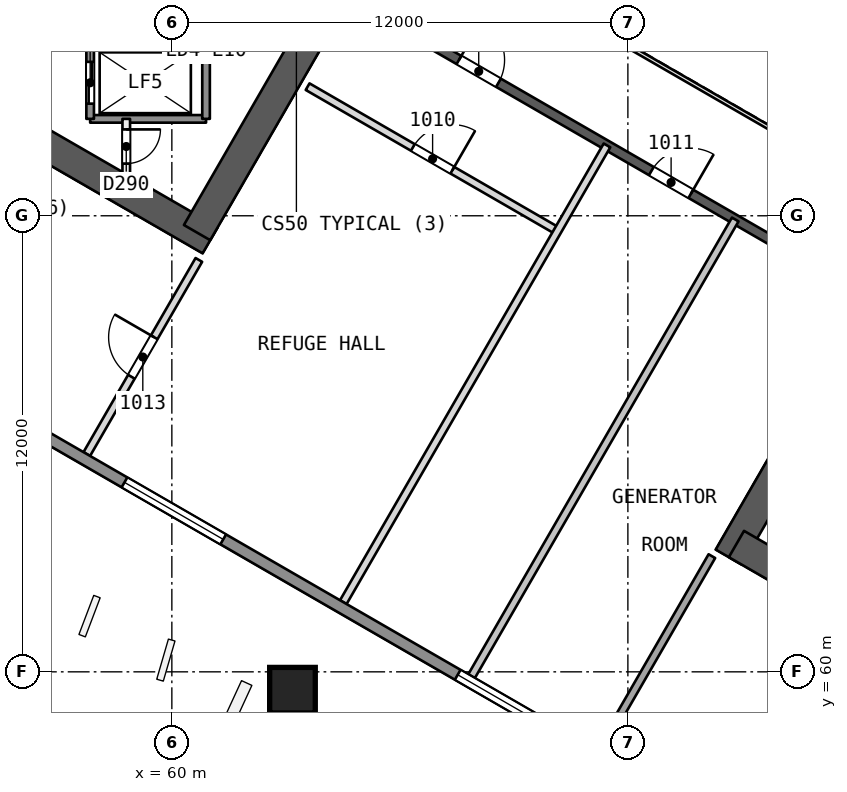
"""IFC4 building model, lengths in metres.
Left out: names, types, materials, properties, quantities, classifications, styles, units other than length and angle.
Written with IfcOpenShell. Run it as: python <this file> out.ifc"""

import sys

from ifc_helpers import new_model, si_unit, direction, frame, frame_2d, origin, origin_2d, place, context, subcontext, project, spatial, rectangle, extrude, element, fill, save


model = new_model("IFC4")
c1 = context("Model", 3, precision=1e-05, world=origin(), true_north=direction((0.0, 1.0)))
c2 = subcontext(c1, "Body", "Model", "MODEL_VIEW")
j1 = project(units=[si_unit("LENGTHUNIT", "METRE"), si_unit("PLANEANGLEUNIT", "RADIAN")], contexts=[c1])
p1 = place(None, origin())
s1 = spatial("IfcSite", under=j1, at=p1, CompositionType="ELEMENT")
p2 = place(p1, origin())
s2 = spatial("IfcBuilding", under=s1, at=p2, CompositionType="ELEMENT")
p3 = place(p2, frame((0.0, 0.0, 48.5)))
s3 = spatial("IfcBuildingStorey", under=s2, at=p3, CompositionType="ELEMENT", Elevation=48.5)
p4 = place(p3, frame((48.797, 78.408, 0.0), z_axis=(0.0, 0.0, 1.0), x_axis=(0.866032504327, -0.499987701298, 0.0)))
e1 = element("IfcWall", 1, at=p4, inside=s3, PredefinedType="SHEAR", context=c2, shape_type="SweptSolid", body=[
    extrude(rectangle(XDim=14.102, YDim=0.8, at=frame_2d((7.051, 0.0))), origin(), (0.0, 0.0, 1.0), 4.4),
])
p5 = place(p3, frame((60.664, 71.557, 0.0), z_axis=(0.0, 0.0, 1.0), x_axis=(0.50000409368, 0.866023040284, 0.0)))
e2 = element("IfcWall", 2, at=p5, inside=s3, PredefinedType="SHEAR", context=c2, shape_type="SweptSolid", body=[
    extrude(rectangle(XDim=9.98, YDim=0.8, at=frame_2d((4.99, 0.0))), origin(), (0.0, 0.0, 1.0), 4.4),
])
p6 = place(p5, frame((7.83, 0.0, 0.0)))
e3 = element("IfcOpeningElement", 3, at=p6, cuts=e2, PredefinedType="OPENING", context=c2, shape_type="SweptSolid", body=[
    extrude(rectangle(XDim=1.2, YDim=2.1, at=frame_2d((0.6, 1.05))), frame((0.0, 0.411, 0.0), z_axis=(0.0, -1.0, 0.0), x_axis=(1.0, 0.0, 0.0)), (0.0, 0.0, 1.0), 0.821),
])
p7 = place(p3, frame((79.731, 71.806, 0.0), z_axis=(0.0, 0.0, 1.0), x_axis=(-0.49999662545, -0.866027352073, 0.0)))
e4 = element("IfcWall", 4, at=p7, inside=s3, PredefinedType="SHEAR", context=c2, shape_type="SweptSolid", body=[
    extrude(rectangle(XDim=10.149, YDim=0.8, at=frame_2d((5.074, 0.0))), origin(), (0.0, 0.0, 1.0), 4.4),
])
p8 = place(p7, frame((0.719, 0.0, 0.0)))
e5 = element("IfcOpeningElement", 5, at=p8, cuts=e4, PredefinedType="OPENING", context=c2, shape_type="SweptSolid", body=[
    extrude(rectangle(XDim=1.2, YDim=2.1, at=frame_2d((0.6, 1.05))), frame((0.0, 0.411, 0.0), z_axis=(0.0, -1.0, 0.0), x_axis=(1.0, 0.0, 0.0)), (0.0, 0.0, 1.0), 0.821),
])
p9 = place(p3, frame((74.856, 63.363, 0.0), z_axis=(0.0, 0.0, 1.0), x_axis=(0.866029478545, -0.499992942241, 0.0)))
e6 = element("IfcWall", 6, at=p9, inside=s3, PredefinedType="SHEAR", context=c2, shape_type="SweptSolid", body=[
    extrude(rectangle(XDim=13.933, YDim=0.8, at=frame_2d((6.967, 0.0))), origin(), (0.0, 0.0, 1.0), 4.4),
])
p10 = place(p3, frame((64.7, 77.748, 0.0), z_axis=(0.0, 0.0, 1.0), x_axis=(0.866026492143, -0.499998114903, 0.0)))
e7 = element("IfcWall", 7, at=p10, inside=s3, PredefinedType="SHEAR", context=c2, shape_type="SweptSolid", body=[
    extrude(rectangle(XDim=15.588, YDim=0.25, at=frame_2d((7.794, 0.0))), origin(), (0.0, 0.0, 1.0), 3.9),
])
p11 = place(p10, frame((3.297, 0.0, 0.0)))
e8 = element("IfcOpeningElement", 8, at=p11, cuts=e7, PredefinedType="OPENING", context=c2, shape_type="SweptSolid", body=[
    extrude(rectangle(XDim=1.2, YDim=2.4, at=frame_2d((0.6, 1.2))), frame((0.0, 0.135, 0.0), z_axis=(0.0, -1.0, 0.0), x_axis=(1.0, 0.0, 0.0)), (0.0, 0.0, 1.0), 0.271),
])
p12 = place(p10, frame((9.143, 0.0, 0.0)))
e9 = element("IfcOpeningElement", 9, at=p12, cuts=e7, PredefinedType="OPENING", context=c2, shape_type="SweptSolid", body=[
    extrude(rectangle(XDim=1.2, YDim=2.4, at=frame_2d((0.6, 1.2))), frame((0.0, 0.135, 0.0), z_axis=(0.0, -1.0, 0.0), x_axis=(1.0, 0.0, 0.0)), (0.0, 0.0, 1.0), 0.271),
])
p13 = place(p10, frame((13.04, 0.0, 0.0)))
e10 = element("IfcOpeningElement", 10, at=p13, cuts=e7, PredefinedType="OPENING", context=c2, shape_type="SweptSolid", body=[
    extrude(rectangle(XDim=1.2, YDim=2.4, at=frame_2d((0.6, 1.2))), frame((0.0, 0.135, 0.0), z_axis=(0.0, -1.0, 0.0), x_axis=(1.0, 0.0, 0.0)), (0.0, 0.0, 1.0), 0.271),
])
p14 = place(p3, frame((63.162, 59.496, 0.0), z_axis=(0.010041240412, 0.017475086904, 0.999796876785), x_axis=(-0.498116032596, -0.866876123157, 0.020154532277)))
e11 = element("IfcColumn", 11, at=p14, inside=s3, PredefinedType="COLUMN", context=c2, shape_type="SweptSolid", body=[
    extrude(rectangle(XDim=1.2, YDim=1.2, at=origin_2d()), origin(), (0.0, 0.0, 1.0), 4.401),
])
p15 = place(p3, frame((63.572, 75.397, 0.0), z_axis=(0.0, 0.0, 1.0), x_axis=(0.866024999478, -0.500000700278, 0.0)))
e12 = element("IfcWall", 12, at=p15, inside=s3, PredefinedType="PARTITIONING", context=c2, shape_type="SweptSolid", body=[
    extrude(rectangle(XDim=7.595, YDim=0.2, at=frame_2d((3.798, 0.0))), origin(), (0.0, 0.0, 1.0), 3.9),
])
p16 = place(p15, frame((3.198, 0.0, 0.0)))
e13 = element("IfcOpeningElement", 13, at=p16, cuts=e12, PredefinedType="OPENING", context=c2, shape_type="SweptSolid", body=[
    extrude(rectangle(XDim=1.2, YDim=2.4, at=frame_2d((0.6, 1.2))), frame((0.0, 0.11, 0.0), z_axis=(0.0, -1.0, 0.0), x_axis=(1.0, 0.0, 0.0)), (0.0, 0.0, 1.0), 0.221),
])
p17 = place(p3, frame((64.511, 61.833, 0.0), z_axis=(0.0, 0.0, 1.0), x_axis=(0.499997074782, 0.866027092653, 0.0)))
e14 = element("IfcWall", 14, at=p17, inside=s3, PredefinedType="PARTITIONING", context=c2, shape_type="SweptSolid", body=[
    extrude(rectangle(XDim=13.877, YDim=0.2, at=frame_2d((6.939, 0.0))), origin(), (0.0, 0.0, 1.0), 3.9),
])
p18 = place(p3, frame((57.761, 65.73, 0.0), z_axis=(0.0, 0.0, 1.0), x_axis=(0.499985191823, 0.866033953121, 0.0)))
e15 = element("IfcWall", 15, at=p18, inside=s3, PredefinedType="PARTITIONING", context=c2, shape_type="SweptSolid", body=[
    extrude(rectangle(XDim=5.899, YDim=0.2, at=frame_2d((2.949, 0.0))), origin(), (0.0, 0.0, 1.0), 3.9),
])
p19 = place(p18, frame((2.349, 0.0, 0.0)))
e16 = element("IfcOpeningElement", 16, at=p19, cuts=e15, PredefinedType="OPENING", context=c2, shape_type="SweptSolid", body=[
    extrude(rectangle(XDim=1.2, YDim=2.4, at=frame_2d((0.6, 1.2))), frame((0.0, 0.11, 0.0), z_axis=(0.0, -1.0, 0.0), x_axis=(1.0, 0.0, 0.0)), (0.0, 0.0, 1.0), 0.221),
])
p20 = place(p3, frame((67.886, 59.884, 0.0), z_axis=(0.0, 0.0, 1.0), x_axis=(0.499997074782, 0.866027092653, 0.0)))
e17 = element("IfcWall", 17, at=p20, inside=s3, PredefinedType="PARTITIONING", context=c2, shape_type="SweptSolid", body=[
    extrude(rectangle(XDim=13.877, YDim=0.2, at=frame_2d((6.939, 0.0))), origin(), (0.0, 0.0, 1.0), 3.9),
])
p21 = place(p3, frame((74.21, 63.044, 0.0), z_axis=(0.0, 0.0, 1.0), x_axis=(-0.499985191823, -0.866033953121, 0.0)))
e18 = element("IfcWall", 18, at=p21, inside=s3, PredefinedType="PARTITIONING", context=c2, shape_type="SweptSolid", body=[
    extrude(rectangle(XDim=5.899, YDim=0.2, at=frame_2d((2.949, 0.0))), origin(), (0.0, 0.0, 1.0), 3.9),
])
p22 = place(p3, frame((90.743, 46.516, 0.0), z_axis=(0.0, 0.0, 1.0), x_axis=(-0.866025105017, 0.50000051748, 0.0)))
e19 = element("IfcWall", 19, at=p22, inside=s3, PredefinedType="SOLIDWALL", context=c2, shape_type="SweptSolid", body=[
    extrude(rectangle(XDim=60.751, YDim=0.3, at=frame_2d((30.375, 0.0))), origin(), (0.0, 0.0, 1.0), 3.9),
])
p23 = place(p22, frame((3.562, 0.0, 0.6)))
e20 = element("IfcOpeningElement", 20, at=p23, cuts=e19, PredefinedType="OPENING", context=c2, shape_type="SweptSolid", body=[
    extrude(rectangle(XDim=3.0, YDim=2.4, at=frame_2d((1.5, 1.2))), frame((0.0, 0.161, 0.0), z_axis=(0.0, -1.0, 0.0), x_axis=(1.0, 0.0, 0.0)), (0.0, 0.0, 1.0), 0.321),
])
p24 = place(p22, frame((13.688, 0.0, 0.6)))
e21 = element("IfcOpeningElement", 21, at=p24, cuts=e19, PredefinedType="OPENING", context=c2, shape_type="SweptSolid", body=[
    extrude(rectangle(XDim=3.0, YDim=2.4, at=frame_2d((1.5, 1.2))), frame((0.0, 0.161, 0.0), z_axis=(0.0, -1.0, 0.0), x_axis=(1.0, 0.0, 0.0)), (0.0, 0.0, 1.0), 0.321),
])
p25 = place(p22, frame((23.813, 0.0, 0.6)))
e22 = element("IfcOpeningElement", 22, at=p25, cuts=e19, PredefinedType="OPENING", context=c2, shape_type="SweptSolid", body=[
    extrude(rectangle(XDim=3.0, YDim=2.4, at=frame_2d((1.5, 1.2))), frame((0.0, 0.161, 0.0), z_axis=(0.0, -1.0, 0.0), x_axis=(1.0, 0.0, 0.0)), (0.0, 0.0, 1.0), 0.321),
])
p26 = place(p22, frame((33.938, 0.0, 0.6)))
e23 = element("IfcOpeningElement", 23, at=p26, cuts=e19, PredefinedType="OPENING", context=c2, shape_type="SweptSolid", body=[
    extrude(rectangle(XDim=3.0, YDim=2.4, at=frame_2d((1.5, 1.2))), frame((0.0, 0.161, 0.0), z_axis=(0.0, -1.0, 0.0), x_axis=(1.0, 0.0, 0.0)), (0.0, 0.0, 1.0), 0.321),
])
p27 = place(p22, frame((44.063, 0.0, 0.6)))
e24 = element("IfcOpeningElement", 24, at=p27, cuts=e19, PredefinedType="OPENING", context=c2, shape_type="SweptSolid", body=[
    extrude(rectangle(XDim=3.0, YDim=2.4, at=frame_2d((1.5, 1.2))), frame((0.0, 0.161, 0.0), z_axis=(0.0, -1.0, 0.0), x_axis=(1.0, 0.0, 0.0)), (0.0, 0.0, 1.0), 0.321),
])
p28 = place(p22, frame((54.188, 0.0, 0.6)))
e25 = element("IfcOpeningElement", 25, at=p28, cuts=e19, PredefinedType="OPENING", context=c2, shape_type="SweptSolid", body=[
    extrude(rectangle(XDim=3.0, YDim=2.4, at=frame_2d((1.5, 1.2))), frame((0.0, 0.161, 0.0), z_axis=(0.0, -1.0, 0.0), x_axis=(1.0, 0.0, 0.0)), (0.0, 0.0, 1.0), 0.321),
])
p29 = place(p3, frame((60.9, 74.55, 0.0), z_axis=(0.0, 0.0, 1.0), x_axis=(-1.0, 0.0, 0.0)))
e26 = element("IfcWall", 26, at=p29, inside=s3, PredefinedType="SOLIDWALL", context=c2, shape_type="SweptSolid", body=[
    extrude(rectangle(XDim=3.05, YDim=0.2, at=frame_2d((1.525, 0.0))), origin(), (0.0, 0.0, 1.0), 3.9),
])
p30 = place(p3, frame((60.9, 85.45, 0.0), z_axis=(0.0, 0.0, 1.0), x_axis=(0.0, -1.0, 0.0)))
e27 = element("IfcWall", 27, at=p30, inside=s3, PredefinedType="SOLIDWALL", context=c2, shape_type="SweptSolid", body=[
    extrude(rectangle(XDim=10.9, YDim=0.2, at=frame_2d((5.45, 0.0))), origin(), (0.0, 0.0, 1.0), 3.9),
])
p31 = place(p30, frame((0.575, 0.0, 0.0)))
e28 = element("IfcOpeningElement", 28, at=p31, cuts=e27, PredefinedType="OPENING", context=c2, shape_type="SweptSolid", body=[
    extrude(rectangle(XDim=1.1, YDim=2.1, at=frame_2d((0.55, 1.05))), frame((0.0, 0.11, 0.0), z_axis=(0.0, -1.0, 0.0), x_axis=(1.0, 0.0, 0.0)), (0.0, 0.0, 1.0), 0.221),
])
p32 = place(p30, frame((2.825, 0.0, 0.0)))
e29 = element("IfcOpeningElement", 29, at=p32, cuts=e27, PredefinedType="OPENING", context=c2, shape_type="SweptSolid", body=[
    extrude(rectangle(XDim=1.1, YDim=2.1, at=frame_2d((0.55, 1.05))), frame((0.0, 0.11, 0.0), z_axis=(0.0, -1.0, 0.0), x_axis=(1.0, 0.0, 0.0)), (0.0, 0.0, 1.0), 0.221),
])
p33 = place(p30, frame((5.075, 0.0, 0.0)))
e30 = element("IfcOpeningElement", 30, at=p33, cuts=e27, PredefinedType="OPENING", context=c2, shape_type="SweptSolid", body=[
    extrude(rectangle(XDim=1.1, YDim=2.1, at=frame_2d((0.55, 1.05))), frame((0.0, 0.11, 0.0), z_axis=(0.0, -1.0, 0.0), x_axis=(1.0, 0.0, 0.0)), (0.0, 0.0, 1.0), 0.221),
])
p34 = place(p30, frame((7.325, 0.0, 0.0)))
e31 = element("IfcOpeningElement", 31, at=p34, cuts=e27, PredefinedType="OPENING", context=c2, shape_type="SweptSolid", body=[
    extrude(rectangle(XDim=1.1, YDim=2.1, at=frame_2d((0.55, 1.05))), frame((0.0, 0.11, 0.0), z_axis=(0.0, -1.0, 0.0), x_axis=(1.0, 0.0, 0.0)), (0.0, 0.0, 1.0), 0.221),
])
p35 = place(p3, frame((58.8, 74.55, 0.0), z_axis=(0.0, 0.0, 1.0), x_axis=(0.0, -1.0, 0.0)))
e32 = element("IfcWall", 32, at=p35, inside=s3, PredefinedType="PARTITIONING", context=c2, shape_type="SweptSolid", body=[
    extrude(rectangle(XDim=1.455, YDim=0.2, at=frame_2d((0.728, 0.0))), origin(), (0.0, 0.0, 1.0), 3.9),
])
p36 = place(p35, frame((0.278, 0.0, 0.0)))
e33 = element("IfcOpeningElement", 33, at=p36, cuts=e32, PredefinedType="OPENING", context=c2, shape_type="SweptSolid", body=[
    extrude(rectangle(XDim=0.9, YDim=2.1, at=frame_2d((0.45, 1.05))), frame((0.0, 0.11, 0.0), z_axis=(0.0, -1.0, 0.0), x_axis=(1.0, 0.0, 0.0)), (0.0, 0.0, 1.0), 0.221),
])
p37 = place(p3, frame((57.85, 76.45, 0.0), z_axis=(0.0, 0.0, 1.0), x_axis=(0.0, -1.0, 0.0)))
e34 = element("IfcWall", 34, at=p37, inside=s3, PredefinedType="SOLIDWALL", context=c2, shape_type="SweptSolid", body=[
    extrude(rectangle(XDim=1.9, YDim=0.2, at=frame_2d((0.95, 0.0))), origin(), (0.0, 0.0, 1.0), 3.9),
])
p38 = place(p37, frame((0.4, 0.0, 0.0)))
e35 = element("IfcOpeningElement", 35, at=p38, cuts=e34, PredefinedType="OPENING", context=c2, shape_type="SweptSolid", body=[
    extrude(rectangle(XDim=1.1, YDim=2.1, at=frame_2d((0.55, 1.05))), frame((0.0, 0.11, 0.0), z_axis=(0.0, -1.0, 0.0), x_axis=(1.0, 0.0, 0.0)), (0.0, 0.0, 1.0), 0.221),
])
p39 = place(p3, frame((67.702, 78.948, 0.0), z_axis=(0.0, 0.0, 1.0), x_axis=(0.866026658274, -0.499997827154, 0.0)))
e36 = element("IfcWall", 36, at=p39, inside=s3, PredefinedType="PARTITIONING", context=c2, shape_type="SweptSolid", body=[
    extrude(rectangle(XDim=11.588, YDim=0.1, at=frame_2d((5.794, 0.0))), origin(), (0.0, 0.0, 1.0), 3.9),
])
p40 = place(p11, origin())
e37 = element("IfcDoor", 37, at=p40, inside=s3, OperationType="SINGLE_SWING_LEFT", PredefinedType="NOTDEFINED", context=c2, shape_type="SweptSolid", body=[
    extrude(rectangle(XDim=1.2, YDim=2.4, at=frame_2d((0.6, 1.2))), frame((0.0, 0.025, 0.0), z_axis=(0.0, -1.0, 0.0), x_axis=(1.0, 0.0, 0.0)), (0.0, 0.0, 1.0), 0.05),
])
fill(e8, e37)
p41 = place(p16, origin())
e38 = element("IfcDoor", 38, at=p41, inside=s3, OperationType="SINGLE_SWING_RIGHT", PredefinedType="NOTDEFINED", context=c2, shape_type="SweptSolid", body=[
    extrude(rectangle(XDim=1.2, YDim=2.4, at=frame_2d((0.6, 1.2))), frame((0.0, 0.025, 0.0), z_axis=(0.0, -1.0, 0.0), x_axis=(1.0, 0.0, 0.0)), (0.0, 0.0, 1.0), 0.05),
])
fill(e13, e38)
p42 = place(p12, origin())
e39 = element("IfcDoor", 39, at=p42, inside=s3, OperationType="SINGLE_SWING_RIGHT", PredefinedType="NOTDEFINED", context=c2, shape_type="SweptSolid", body=[
    extrude(rectangle(XDim=1.2, YDim=2.4, at=frame_2d((0.6, 1.2))), frame((0.0, 0.025, 0.0), z_axis=(0.0, -1.0, 0.0), x_axis=(1.0, 0.0, 0.0)), (0.0, 0.0, 1.0), 0.05),
])
fill(e9, e39)
p43 = place(p19, origin())
e40 = element("IfcDoor", 40, at=p43, inside=s3, OperationType="SINGLE_SWING_RIGHT", PredefinedType="NOTDEFINED", context=c2, shape_type="SweptSolid", body=[
    extrude(rectangle(XDim=1.2, YDim=2.4, at=frame_2d((0.6, 1.2))), frame((0.0, 0.025, 0.0), z_axis=(0.0, -1.0, 0.0), x_axis=(1.0, 0.0, 0.0)), (0.0, 0.0, 1.0), 0.05),
])
fill(e16, e40)
p44 = place(p25, origin())
e41 = element("IfcWindow", 41, at=p44, inside=s3, PartitioningType="SINGLE_PANEL", PredefinedType="WINDOW", context=c2, shape_type="SweptSolid", body=[
    extrude(rectangle(XDim=3.0, YDim=2.4, at=frame_2d((1.5, 1.2))), frame((0.0, 0.03, 0.0), z_axis=(0.0, -1.0, 0.0), x_axis=(1.0, 0.0, 0.0)), (0.0, 0.0, 1.0), 0.06),
])
fill(e22, e41)
p45 = place(p26, origin())
e42 = element("IfcWindow", 42, at=p45, inside=s3, PartitioningType="SINGLE_PANEL", PredefinedType="WINDOW", context=c2, shape_type="SweptSolid", body=[
    extrude(rectangle(XDim=3.0, YDim=2.4, at=frame_2d((1.5, 1.2))), frame((0.0, 0.03, 0.0), z_axis=(0.0, -1.0, 0.0), x_axis=(1.0, 0.0, 0.0)), (0.0, 0.0, 1.0), 0.06),
])
fill(e23, e42)
p46 = place(p38, origin())
e43 = element("IfcDoor", 43, at=p46, inside=s3, OperationType="SLIDING_TO_RIGHT", PredefinedType="NOTDEFINED", context=c2, shape_type="SweptSolid", body=[
    extrude(rectangle(XDim=1.1, YDim=2.1, at=frame_2d((0.55, 1.05))), frame((0.0, 0.025, 0.0), z_axis=(0.0, -1.0, 0.0), x_axis=(1.0, 0.0, 0.0)), (0.0, 0.0, 1.0), 0.05),
])
fill(e35, e43)
p47 = place(p36, origin())
e44 = element("IfcDoor", 44, at=p47, inside=s3, OperationType="SINGLE_SWING_LEFT", PredefinedType="NOTDEFINED", context=c2, shape_type="SweptSolid", body=[
    extrude(rectangle(XDim=0.9, YDim=2.1, at=frame_2d((0.45, 1.05))), frame((0.0, 0.025, 0.0), z_axis=(0.0, -1.0, 0.0), x_axis=(1.0, 0.0, 0.0)), (0.0, 0.0, 1.0), 0.05),
])
fill(e33, e44)
save(model, sys.argv[1])
